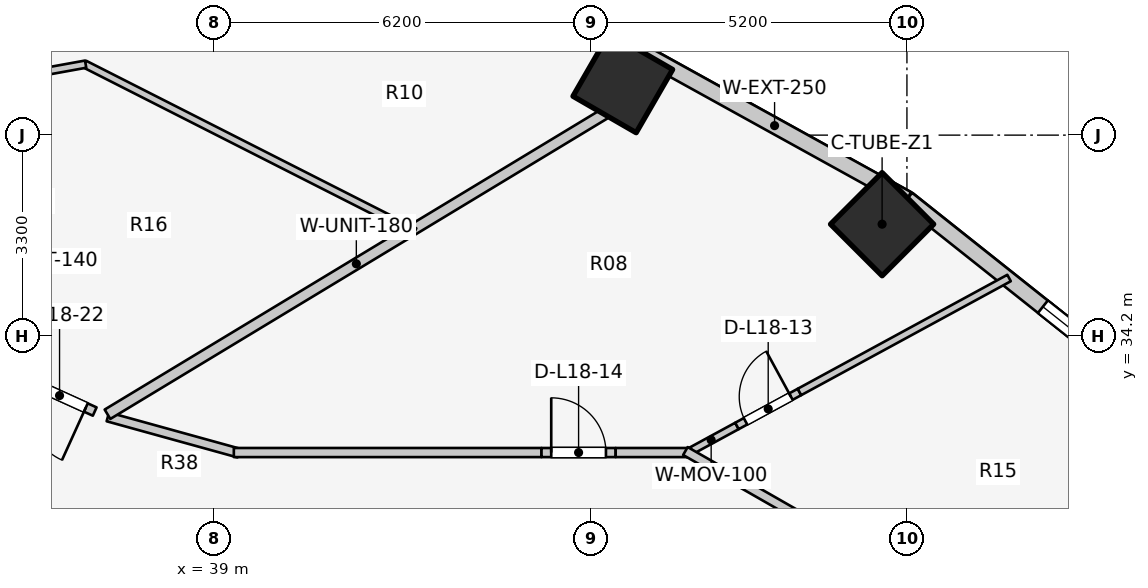
"""IFC4 building model, lengths in metres.
Left out: names, types, materials, properties, quantities, classifications, styles, units other than length and angle.
Written with IfcOpenShell. Run it as: python <this file> out.ifc"""

import sys

from ifc_helpers import new_model, si_unit, direction, frame, frame_2d, origin, origin_2d, place, context, subcontext, project, spatial, rectangle, extrude, element, fill, save


model = new_model("IFC4")
c1 = context("Model", 3, precision=1e-05, world=origin(), true_north=direction((0.0, 1.0)))
c2 = subcontext(c1, "Body", "Model", "MODEL_VIEW")
j1 = project(units=[si_unit("LENGTHUNIT", "METRE"), si_unit("PLANEANGLEUNIT", "RADIAN")], contexts=[c1])
p1 = place(None, origin())
s1 = spatial("IfcSite", under=j1, at=p1, CompositionType="ELEMENT")
p2 = place(p1, origin())
s2 = spatial("IfcBuilding", under=s1, at=p2, CompositionType="ELEMENT")
p3 = place(p2, frame((0.0, 0.0, 61.7)))
s3 = spatial("IfcBuildingStorey", under=s2, at=p3, CompositionType="ELEMENT", Elevation=61.7)
for number, where, z_axis, x_axis in (
    (1, (49.992, 36.035, 0.0), (0.0, 0.0, 1.0), (0.707, 0.707, 0.0)),
    (2, (45.727, 38.359, 0.0), (0.0, 0.0, 1.0), (0.5, 0.866, 0.0)),
):
    element("IfcColumn", number, at=place(p3, frame(where, z_axis=z_axis, x_axis=x_axis)), inside=s3, PredefinedType="COLUMN", context=c2, shape_type="SweptSolid", body=[
        extrude(rectangle(XDim=1.2, YDim=1.2, at=origin_2d()), origin(), (0.0, 0.0, 1.0), 3.1),
    ])
p4 = place(p3, frame((54.194, 33.441, 0.0), z_axis=(0.0, 0.0, 1.0), x_axis=(-0.783123133379, 0.621866672179, 0.0)))
e3 = element("IfcWall", 3, at=p4, inside=s3, PredefinedType="STANDARD", context=c2, shape_type="SweptSolid", body=[
    extrude(rectangle(XDim=4.839, YDim=0.26, at=frame_2d((2.419, 0.0))), origin(), (0.0, 0.0, 1.0), 1.22),
])
p5 = place(p4, frame((0.789, 0.0, 0.15)))
e4 = element("IfcOpeningElement", 4, at=p5, cuts=e3, PredefinedType="OPENING", context=c2, shape_type="SweptSolid", body=[
    extrude(rectangle(XDim=1.2, YDim=0.9, at=frame_2d((0.6, 0.45))), frame((0.0, 0.14, 0.0), z_axis=(0.0, -1.0, 0.0), x_axis=(1.0, 0.0, 0.0)), (0.0, 0.0, 1.0), 0.28),
])
p6 = place(p3, frame((50.405, 36.45, 0.0), z_axis=(0.0, 0.0, 1.0), x_axis=(-0.875137303239, 0.483874674352, 0.0)))
e5 = element("IfcWall", 5, at=p6, inside=s3, PredefinedType="STANDARD", context=c2, shape_type="SweptSolid", body=[
    extrude(rectangle(XDim=4.985, YDim=0.26, at=frame_2d((2.493, 0.0))), origin(), (0.0, 0.0, 1.0), 1.22),
])
p7 = place(p3, frame((46.756, 32.256, 0.0), z_axis=(0.0, 0.0, 1.0), x_axis=(0.878580692024, 0.477593935894, 0.0)))
e6 = element("IfcWall", 6, at=p7, inside=s3, PredefinedType="MOVABLE", context=c2, shape_type="SweptSolid", body=[
    extrude(rectangle(XDim=0.966, YDim=0.12, at=frame_2d((0.483, 0.0))), origin(), (0.0, 0.0, 1.0), 2.575),
])
p8 = place(p3, frame((47.604, 32.717, 0.0), z_axis=(0.0, 0.0, 1.0), x_axis=(0.878540750178, 0.4776674055, 0.0)))
e7 = element("IfcWall", 7, at=p8, inside=s3, PredefinedType="MOVABLE", context=c2, shape_type="SweptSolid", body=[
    extrude(rectangle(XDim=1.17, YDim=0.12, at=frame_2d((0.585, 0.0))), origin(), (0.0, 0.0, 1.0), 2.11),
])
p9 = place(p8, frame((0.16, 0.0, 0.0)))
e8 = element("IfcOpeningElement", 8, at=p9, cuts=e7, PredefinedType="OPENING", context=c2, shape_type="SweptSolid", body=[
    extrude(rectangle(XDim=0.85, YDim=2.05, at=frame_2d((0.425, 1.025))), frame((0.0, 0.07, 0.0), z_axis=(0.0, -1.0, 0.0), x_axis=(1.0, 0.0, 0.0)), (0.0, 0.0, 1.0), 0.14),
])
p10 = place(p3, frame((48.632, 33.276, 0.0), z_axis=(0.0, 0.0, 1.0), x_axis=(0.878543913196, 0.477661587932, 0.0)))
e9 = element("IfcWall", 9, at=p10, inside=s3, PredefinedType="MOVABLE", context=c2, shape_type="SweptSolid", body=[
    extrude(rectangle(XDim=3.924, YDim=0.12, at=frame_2d((1.962, 0.0))), origin(), (0.0, 0.0, 1.0), 1.22),
])
p11 = place(p3, frame((37.258, 32.867, 0.0), z_axis=(0.0, 0.0, 1.0), x_axis=(0.963833843713, -0.266503886865, 0.0)))
e10 = element("IfcWall", 10, at=p11, inside=s3, PredefinedType="PARTITIONING", context=c2, shape_type="SweptSolid", body=[
    extrude(rectangle(XDim=2.232, YDim=0.15, at=frame_2d((1.116, 0.0))), origin(), (0.0, 0.0, 1.0), 1.22),
])
p12 = place(p3, frame((39.33, 32.28, 0.0), z_axis=(0.0, 0.0, 1.0), x_axis=(1.0, 0.0, 0.0)))
e11 = element("IfcWall", 11, at=p12, inside=s3, PredefinedType="PARTITIONING", context=c2, shape_type="SweptSolid", body=[
    extrude(rectangle(XDim=5.06, YDim=0.15, at=frame_2d((2.53, 0.0))), origin(), (0.0, 0.0, 1.0), 1.22),
])
p13 = place(p3, frame((44.39, 32.28, 0.0), z_axis=(0.0, 0.0, 1.0), x_axis=(1.0, 0.0, 0.0)))
e12 = element("IfcWall", 12, at=p13, inside=s3, PredefinedType="PARTITIONING", context=c2, shape_type="SweptSolid", body=[
    extrude(rectangle(XDim=1.22, YDim=0.15, at=frame_2d((0.61, 0.0))), origin(), (0.0, 0.0, 1.0), 2.16),
])
p14 = place(p13, frame((0.16, 0.0, 0.0)))
e13 = element("IfcOpeningElement", 13, at=p14, cuts=e12, PredefinedType="OPENING", context=c2, shape_type="SweptSolid", body=[
    extrude(rectangle(XDim=0.9, YDim=2.1, at=frame_2d((0.45, 1.05))), frame((0.0, 0.085, 0.0), z_axis=(0.0, -1.0, 0.0), x_axis=(1.0, 0.0, 0.0)), (0.0, 0.0, 1.0), 0.17),
])
p15 = place(p3, frame((45.61, 32.28, 0.0), z_axis=(0.0, 0.0, 1.0), x_axis=(1.0, 0.0, 0.0)))
e14 = element("IfcWall", 14, at=p15, inside=s3, PredefinedType="PARTITIONING", context=c2, shape_type="SweptSolid", body=[
    extrude(rectangle(XDim=1.24, YDim=0.15, at=frame_2d((0.62, 0.0))), origin(), (0.0, 0.0, 1.0), 2.575),
])
p16 = place(p3, frame((46.757, 32.305, 0.0), z_axis=(0.0, 0.0, 1.0), x_axis=(0.867991349648, -0.496579315857, 0.0)))
e15 = element("IfcWall", 15, at=p16, inside=s3, PredefinedType="PARTITIONING", context=c2, shape_type="SweptSolid", body=[
    extrude(rectangle(XDim=2.567, YDim=0.15, at=frame_2d((1.283, 0.0))), origin(), (0.0, 0.0, 1.0), 1.22),
])
p17 = place(p3, frame((37.252, 32.91, 0.0), z_axis=(0.0, 0.0, 1.0), x_axis=(0.855817136021, 0.517278483694, 0.0)))
e16 = element("IfcWall", 16, at=p17, inside=s3, PredefinedType="PARTITIONING", context=c2, shape_type="SweptSolid", body=[
    extrude(rectangle(XDim=9.564, YDim=0.18, at=frame_2d((4.782, 0.0))), origin(), (0.0, 0.0, 1.0), 1.22),
])
p18 = place(p3, frame((42.305, 35.914, 0.0), z_axis=(0.0, 0.0, 1.0), x_axis=(-0.891749407737, 0.452529550195, 0.0)))
e17 = element("IfcWall", 17, at=p18, inside=s3, PredefinedType="MOVABLE", context=c2, shape_type="SweptSolid", body=[
    extrude(rectangle(XDim=6.09, YDim=0.12, at=frame_2d((3.045, 0.0))), origin(), (0.0, 0.0, 1.0), 1.22),
])
p19 = place(p3, frame((36.893, 38.667, 0.0), z_axis=(0.0, 0.0, 1.0), x_axis=(-0.984000828306, -0.178163884929, 0.0)))
e18 = element("IfcWall", 18, at=p19, inside=s3, PredefinedType="MOVABLE", context=c2, shape_type="SweptSolid", body=[
    extrude(rectangle(XDim=1.876, YDim=0.12, at=frame_2d((0.938, 0.0))), origin(), (0.0, 0.0, 1.0), 2.575),
])
p20 = place(p3, frame((37.042, 32.954, 0.0), z_axis=(0.0, 0.0, 1.0), x_axis=(-0.910596749825, 0.413295970472, 0.0)))
e19 = element("IfcWall", 19, at=p20, inside=s3, PredefinedType="PARTITIONING", context=c2, shape_type="SweptSolid", body=[
    extrude(rectangle(XDim=1.27, YDim=0.15, at=frame_2d((0.635, 0.0))), origin(), (0.0, 0.0, 1.0), 2.16),
])
p21 = place(p20, frame((0.16, 0.0, 0.0)))
e20 = element("IfcOpeningElement", 20, at=p21, cuts=e19, PredefinedType="OPENING", context=c2, shape_type="SweptSolid", body=[
    extrude(rectangle(XDim=0.95, YDim=2.1, at=frame_2d((0.475, 1.05))), frame((0.0, 0.085, 0.0), z_axis=(0.0, -1.0, 0.0), x_axis=(1.0, 0.0, 0.0)), (0.0, 0.0, 1.0), 0.17),
])
p22 = place(p5, origin())
e21 = element("IfcWindow", 21, at=p22, inside=s3, PartitioningType="SINGLE_PANEL", PredefinedType="WINDOW", context=c2, shape_type="SweptSolid", body=[
    extrude(rectangle(XDim=1.2, YDim=0.9, at=frame_2d((0.6, 0.45))), frame((0.0, 0.03, 0.0), z_axis=(0.0, -1.0, 0.0), x_axis=(1.0, 0.0, 0.0)), (0.0, 0.0, 1.0), 0.06),
])
fill(e4, e21)
p23 = place(p9, origin())
e22 = element("IfcDoor", 22, at=p23, inside=s3, OperationType="SINGLE_SWING_RIGHT", PredefinedType="DOOR", context=c2, shape_type="SweptSolid", body=[
    extrude(rectangle(XDim=0.85, YDim=2.05, at=frame_2d((0.425, 1.025))), frame((0.0, 0.025, 0.0), z_axis=(0.0, -1.0, 0.0), x_axis=(1.0, 0.0, 0.0)), (0.0, 0.0, 1.0), 0.05),
])
fill(e8, e22)
p24 = place(p14, origin())
e23 = element("IfcDoor", 23, at=p24, inside=s3, OperationType="SINGLE_SWING_LEFT", PredefinedType="DOOR", context=c2, shape_type="SweptSolid", body=[
    extrude(rectangle(XDim=0.9, YDim=2.1, at=frame_2d((0.45, 1.05))), frame((0.0, 0.025, 0.0), z_axis=(0.0, -1.0, 0.0), x_axis=(1.0, 0.0, 0.0)), (0.0, 0.0, 1.0), 0.05),
])
fill(e13, e23)
p25 = place(p21, origin())
e24 = element("IfcDoor", 24, at=p25, inside=s3, OperationType="SINGLE_SWING_LEFT", PredefinedType="DOOR", context=c2, shape_type="SweptSolid", body=[
    extrude(rectangle(XDim=0.95, YDim=2.1, at=frame_2d((0.475, 1.05))), frame((0.0, 0.025, 0.0), z_axis=(0.0, -1.0, 0.0), x_axis=(1.0, 0.0, 0.0)), (0.0, 0.0, 1.0), 0.05),
])
fill(e20, e24)
save(model, sys.argv[1])
